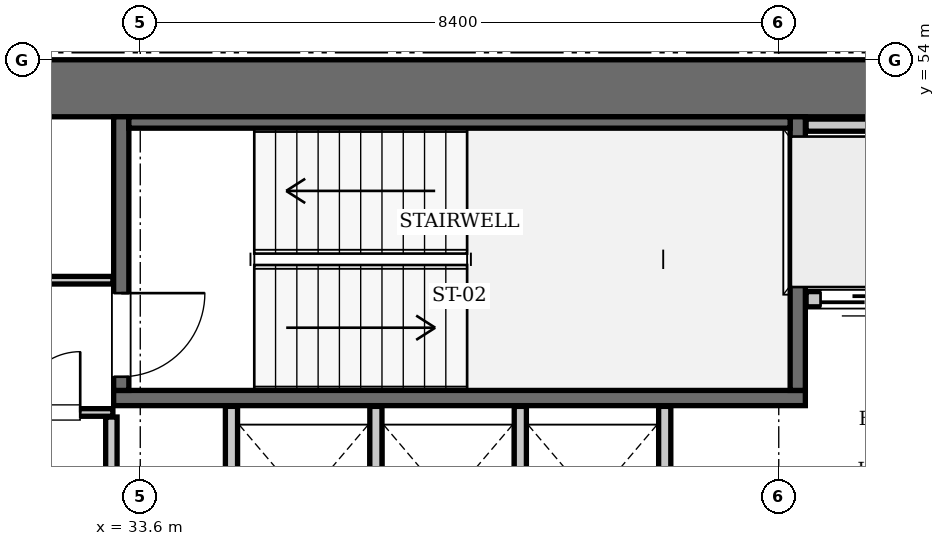
"""IFC4 building model, lengths in metres.
Left out: names, types, materials, properties, quantities, classifications, styles, units other than length and angle.
Written with IfcOpenShell. Run it as: python <this file> out.ifc"""

import sys

from ifc_helpers import new_model, si_unit, direction, frame, frame_2d, origin, place, context, subcontext, project, spatial, rectangle, extrude, element, fill, save


model = new_model("IFC4")
c1 = context("Model", 3, precision=1e-05, world=origin(), true_north=direction((0.0, 1.0)))
c2 = subcontext(c1, "Body", "Model", "MODEL_VIEW")
j1 = project(units=[si_unit("LENGTHUNIT", "METRE"), si_unit("PLANEANGLEUNIT", "RADIAN")], contexts=[c1])
p1 = place(None, origin())
s1 = spatial("IfcSite", under=j1, at=p1, CompositionType="ELEMENT")
p2 = place(p1, origin())
s2 = spatial("IfcBuilding", under=s1, at=p2, CompositionType="ELEMENT")
p3 = place(p2, frame((0.0, 0.0, 181.3)))
s3 = spatial("IfcBuildingStorey", under=s2, at=p3, CompositionType="ELEMENT", Elevation=181.3)
p4 = place(p3, frame((25.2, 53.625, 0.0), z_axis=(0.0, 0.0, 1.0), x_axis=(1.0, 0.0, 0.0)))
e1 = element("IfcWall", 1, at=p4, inside=s3, PredefinedType="SHEAR", context=c2, shape_type="SweptSolid", body=[
    extrude(rectangle(XDim=25.2, YDim=0.75, at=frame_2d((12.6, 0.0))), origin(), (0.0, 0.0, 1.0), 3.85),
])
p5 = place(p3, frame((33.25, 49.55, 0.0), z_axis=(0.0, 0.0, 1.0), x_axis=(1.0, 0.0, 0.0)))
e2 = element("IfcWall", 2, at=p5, inside=s3, PredefinedType="SOLIDWALL", context=c2, shape_type="SweptSolid", body=[
    extrude(rectangle(XDim=9.1, YDim=0.2, at=frame_2d((4.55, 0.0))), origin(), (0.0, 0.0, 1.0), 3.61),
])
p6 = place(p3, frame((42.25, 49.65, 0.0), z_axis=(0.0, 0.0, 1.0), x_axis=(0.0, 1.0, 0.0)))
e3 = element("IfcWall", 3, at=p6, inside=s3, PredefinedType="SOLIDWALL", context=c2, shape_type="SweptSolid", body=[
    extrude(rectangle(XDim=3.6, YDim=0.2, at=frame_2d((1.8, 0.0))), origin(), (0.0, 0.0, 1.0), 3.61),
])
p7 = place(p3, frame((33.35, 49.65, 0.0), z_axis=(0.0, 0.0, 1.0), x_axis=(0.0, 1.0, 0.0)))
e4 = element("IfcWall", 4, at=p7, inside=s3, PredefinedType="SOLIDWALL", context=c2, shape_type="SweptSolid", body=[
    extrude(rectangle(XDim=3.6, YDim=0.2, at=frame_2d((1.8, 0.0))), origin(), (0.0, 0.0, 1.0), 3.61),
])
p8 = place(p7, frame((0.18, 0.0, 0.0)))
e5 = element("IfcOpeningElement", 5, at=p8, cuts=e4, PredefinedType="OPENING", context=c2, shape_type="SweptSolid", body=[
    extrude(rectangle(XDim=1.1, YDim=2.15, at=frame_2d((0.55, 1.075))), frame((0.0, 0.11, 0.0), z_axis=(0.0, -1.0, 0.0), x_axis=(1.0, 0.0, 0.0)), (0.0, 0.0, 1.0), 0.22),
])
p9 = place(p3, frame((33.45, 53.175, 0.0), z_axis=(0.0, 0.0, 1.0), x_axis=(1.0, 0.0, 0.0)))
e6 = element("IfcWall", 6, at=p9, inside=s3, PredefinedType="SOLIDWALL", context=c2, shape_type="SweptSolid", body=[
    extrude(rectangle(XDim=8.7, YDim=0.15, at=frame_2d((4.35, 0.0))), origin(), (0.0, 0.0, 1.0), 3.61),
])
p10 = place(p3, frame((42.36, 50.85, 0.0), z_axis=(0.0, 0.0, 1.0), x_axis=(1.0, 0.0, 0.0)))
e7 = element("IfcWall", 7, at=p10, inside=s3, PredefinedType="SOLIDWALL", context=c2, shape_type="SweptSolid", body=[
    extrude(rectangle(XDim=1.38, YDim=0.2, at=frame_2d((0.69, 0.0))), origin(), (0.0, 0.0, 1.0), 3.61),
])
p11 = place(p10, frame((0.19, 0.0, 0.0)))
e8 = element("IfcOpeningElement", 8, at=p11, cuts=e7, PredefinedType="OPENING", context=c2, shape_type="SweptSolid", body=[
    extrude(rectangle(XDim=1.0, YDim=2.15, at=frame_2d((0.5, 1.075))), frame((0.0, 0.11, 0.0), z_axis=(0.0, -1.0, 0.0), x_axis=(1.0, 0.0, 0.0)), (0.0, 0.0, 1.0), 0.22),
])
p12 = place(p3, frame((42.36, 53.14, 0.0), z_axis=(0.0, 0.0, 1.0), x_axis=(1.0, 0.0, 0.0)))
e9 = element("IfcWall", 9, at=p12, inside=s3, PredefinedType="SOLIDWALL", context=c2, shape_type="SweptSolid", body=[
    extrude(rectangle(XDim=3.14, YDim=0.16, at=frame_2d((1.57, 0.0))), origin(), (0.0, 0.0, 1.0), 3.61),
])
for number, where, z_axis, x_axis in (
    (10, (34.8, 47.25, 0.0), (0.0, 0.0, 1.0), (0.0, 1.0, 0.0)),
    (11, (36.7, 47.25, 0.0), (0.0, 0.0, 1.0), (0.0, 1.0, 0.0)),
    (12, (38.6, 47.25, 0.0), (0.0, 0.0, 1.0), (0.0, 1.0, 0.0)),
    (13, (40.5, 47.25, 0.0), (0.0, 0.0, 1.0), (0.0, 1.0, 0.0)),
):
    element("IfcWall", number, at=place(p3, frame(where, z_axis=z_axis, x_axis=x_axis)), inside=s3, PredefinedType="SOLIDWALL", context=c2, shape_type="SweptSolid", body=[
        extrude(rectangle(XDim=2.19, YDim=0.16, at=frame_2d((1.095, 0.0))), origin(), (0.0, 0.0, 1.0), 3.61),
    ])
p13 = place(p3, frame((33.22, 45.14, 0.0), z_axis=(0.0, 0.0, 1.0), x_axis=(0.0, 1.0, 0.0)))
e14 = element("IfcWall", 14, at=p13, inside=s3, PredefinedType="PARTITIONING", context=c2, shape_type="SweptSolid", body=[
    extrude(rectangle(XDim=4.16, YDim=0.15, at=frame_2d((2.08, 0.0))), origin(), (0.0, 0.0, 1.0), 3.61),
])
p14 = place(p3, frame((30.06, 49.36, 0.0), z_axis=(0.0, 0.0, 1.0), x_axis=(1.0, 0.0, 0.0)))
e15 = element("IfcWall", 15, at=p14, inside=s3, PredefinedType="PARTITIONING", context=c2, shape_type="SweptSolid", body=[
    extrude(rectangle(XDim=3.18, YDim=0.1, at=frame_2d((1.59, 0.0))), origin(), (0.0, 0.0, 1.0), 3.61),
])
p15 = place(p14, frame((1.95, 0.0, 0.0)))
e16 = element("IfcOpeningElement", 16, at=p15, cuts=e15, PredefinedType="OPENING", context=c2, shape_type="SweptSolid", body=[
    extrude(rectangle(XDim=0.8, YDim=2.05, at=frame_2d((0.4, 1.025))), frame((0.0, 0.06, 0.0), z_axis=(0.0, -1.0, 0.0), x_axis=(1.0, 0.0, 0.0)), (0.0, 0.0, 1.0), 0.12),
])
p16 = place(p3, frame((31.82, 51.1, 0.0), z_axis=(0.0, 0.0, 1.0), x_axis=(1.0, 0.0, 0.0)))
e17 = element("IfcWall", 17, at=p16, inside=s3, PredefinedType="PARTITIONING", context=c2, shape_type="SweptSolid", body=[
    extrude(rectangle(XDim=1.42, YDim=0.1, at=frame_2d((0.71, 0.0))), origin(), (0.0, 0.0, 1.0), 3.61),
])
p17 = place(p8, frame((1.1, 0.0, 0.0), z_axis=(0.0, 0.0, 1.0), x_axis=(-1.0, 0.0, 0.0)))
e18 = element("IfcDoor", 18, at=p17, inside=s3, OperationType="SINGLE_SWING_LEFT", PredefinedType="DOOR", context=c2, shape_type="SweptSolid", body=[
    extrude(rectangle(XDim=1.1, YDim=2.15, at=frame_2d((0.55, 1.075))), frame((0.0, 0.025, 0.0), z_axis=(0.0, -1.0, 0.0), x_axis=(1.0, 0.0, 0.0)), (0.0, 0.0, 1.0), 0.05),
])
fill(e5, e18)
p18 = place(p11, frame((1.0, 0.0, 0.0), z_axis=(0.0, 0.0, 1.0), x_axis=(-1.0, 0.0, 0.0)))
e19 = element("IfcDoor", 19, at=p18, inside=s3, OperationType="SLIDING_TO_LEFT", PredefinedType="DOOR", context=c2, shape_type="SweptSolid", body=[
    extrude(rectangle(XDim=1.0, YDim=2.15, at=frame_2d((0.5, 1.075))), frame((0.0, 0.025, 0.0), z_axis=(0.0, -1.0, 0.0), x_axis=(1.0, 0.0, 0.0)), (0.0, 0.0, 1.0), 0.05),
])
fill(e8, e19)
p19 = place(p15, origin())
e20 = element("IfcDoor", 20, at=p19, inside=s3, OperationType="SINGLE_SWING_RIGHT", PredefinedType="DOOR", context=c2, shape_type="SweptSolid", body=[
    extrude(rectangle(XDim=0.8, YDim=2.05, at=frame_2d((0.4, 1.025))), frame((0.0, 0.025, 0.0), z_axis=(0.0, -1.0, 0.0), x_axis=(1.0, 0.0, 0.0)), (0.0, 0.0, 1.0), 0.05),
])
fill(e16, e20)
save(model, sys.argv[1])
